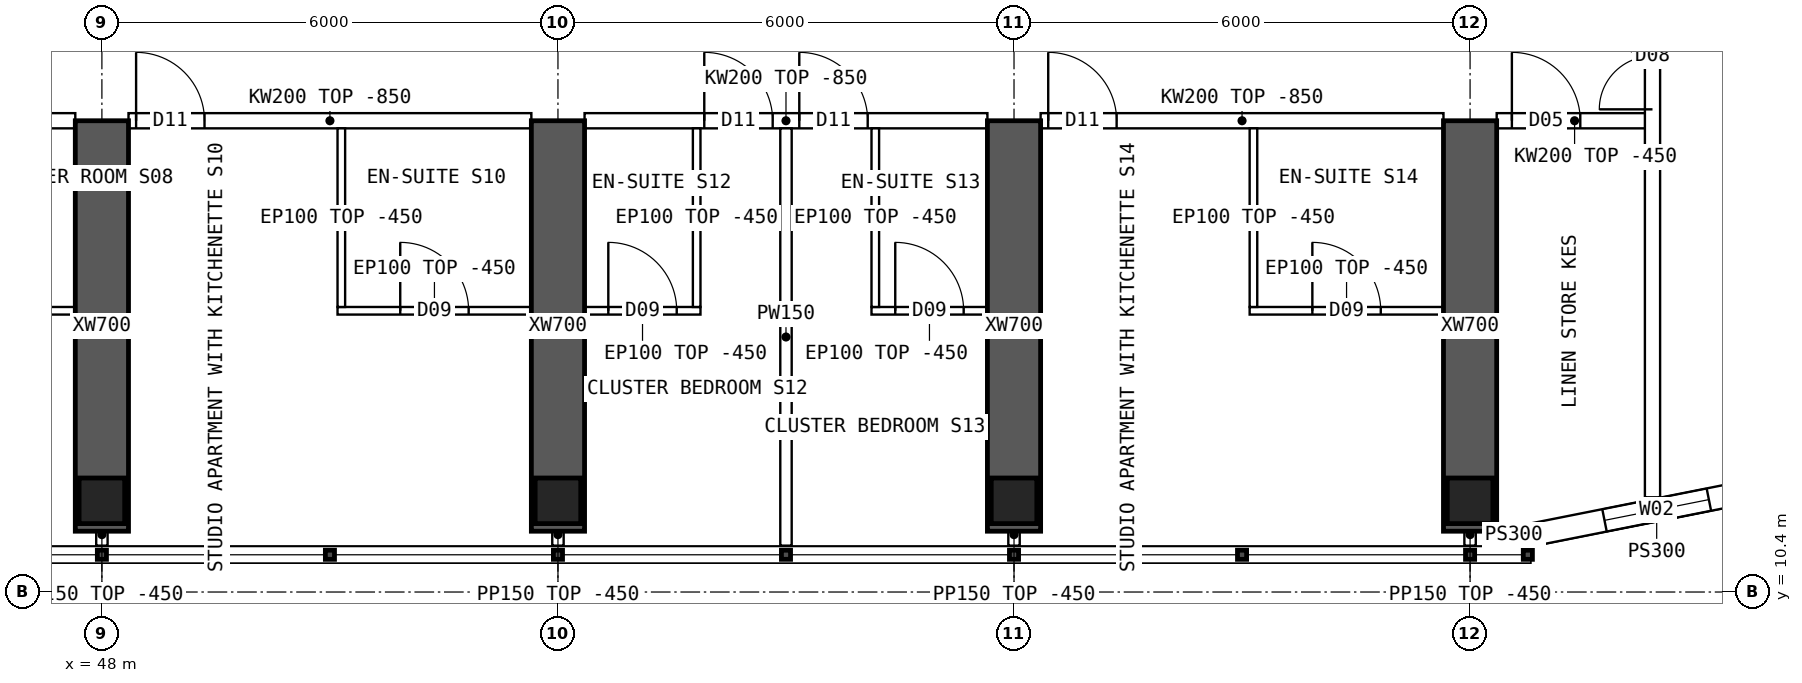
"""IFC4 building model, lengths in metres.
Left out: names, types, materials, properties, quantities, classifications, styles, units other than length and angle.
Written with IfcOpenShell. Run it as: python <this file> out.ifc"""

import sys

from ifc_helpers import new_model, si_unit, direction, frame, frame_2d, origin, origin_2d, place, context, subcontext, project, spatial, polyline, rectangle, hollow_rectangle, outline, extrude, element, fill, save


model = new_model("IFC4")
c1 = context("Model", 3, precision=1e-05, world=origin(), true_north=direction((0.0, 1.0)))
c2 = subcontext(c1, "Body", "Model", "MODEL_VIEW")
j1 = project(units=[si_unit("LENGTHUNIT", "METRE"), si_unit("PLANEANGLEUNIT", "RADIAN")], contexts=[c1])
p1 = place(None, origin())
s1 = spatial("IfcSite", under=j1, at=p1, CompositionType="ELEMENT")
p2 = place(p1, origin())
s2 = spatial("IfcBuilding", under=s1, at=p2, CompositionType="ELEMENT")
p3 = place(p2, frame((0.0, 0.0, 212.8)))
s3 = spatial("IfcBuildingStorey", under=s2, at=p3, CompositionType="ELEMENT", Elevation=212.8)
for number, where, z_axis, x_axis in (
    (1, (48.0, 11.6, 0.0), (0.0, 0.0, 1.0), (1.0, 0.0, 0.0)),
    (2, (54.0, 11.6, 0.0), (0.0, 0.0, 1.0), (1.0, 0.0, 0.0)),
    (3, (60.0, 11.6, 0.0), (0.0, 0.0, 1.0), (1.0, 0.0, 0.0)),
    (4, (66.0, 11.6, 0.0), (0.0, 0.0, 1.0), (1.0, 0.0, 0.0)),
):
    element("IfcColumn", number, at=place(p3, frame(where, z_axis=z_axis, x_axis=x_axis)), inside=s3, PredefinedType="COLUMN", context=c2, shape_type="SweptSolid", body=[
        extrude(hollow_rectangle(XDim=0.6, YDim=0.6, WallThickness=0.06, at=origin_2d()), origin(), (0.0, 0.0, 1.0), 3.75),
    ])
for number, where, z_axis, x_axis in (
    (5, (48.0, 11.2, 0.0), (0.0, 0.0, 1.0), (0.0, 1.0, 0.0)),
    (6, (54.0, 11.2, 0.0), (0.0, 0.0, 1.0), (0.0, 1.0, 0.0)),
    (7, (60.0, 11.2, 0.0), (0.0, 0.0, 1.0), (0.0, 1.0, 0.0)),
    (8, (66.0, 11.2, 0.0), (0.0, 0.0, 1.0), (0.0, 1.0, 0.0)),
):
    element("IfcWall", number, at=place(p3, frame(where, z_axis=z_axis, x_axis=x_axis)), inside=s3, PredefinedType="SHEAR", context=c2, shape_type="SweptSolid", body=[
        extrude(rectangle(XDim=5.4, YDim=0.7, at=frame_2d((2.7, 0.0))), origin(), (0.0, 0.0, 1.0), 3.75),
    ])
p4 = place(p3, frame((66.8, 11.15, 0.0), z_axis=(0.0, 0.0, 1.0), x_axis=(0.98078325777, 0.195100490205, 0.0)))
e9 = element("IfcWall", 9, at=p4, inside=s3, PredefinedType="SOLIDWALL", context=c2, shape_type="SweptSolid", body=[
    extrude(outline(polyline([(-0.03, -0.15), (3.405, -0.15), (3.345, 0.15), (0.03, 0.15), (-0.03, -0.15)])), origin(), (0.0, 0.0, 1.0), 3.3),
])
p5 = place(p4, frame((0.988, 0.0, 0.9)))
e10 = element("IfcOpeningElement", 10, at=p5, cuts=e9, PredefinedType="OPENING", context=c2, shape_type="SweptSolid", body=[
    extrude(rectangle(XDim=1.4, YDim=1.8, at=frame_2d((0.7, 0.9))), frame((0.0, 0.16, 0.0), z_axis=(0.0, -1.0, 0.0), x_axis=(1.0, 0.0, 0.0)), (0.0, 0.0, 1.0), 0.32),
])
p6 = place(p3, frame((66.8, 11.15, 0.0), z_axis=(0.0, 0.0, 1.0), x_axis=(-1.0, 0.0, 0.0)))
e11 = element("IfcWall", 11, at=p6, inside=s3, PredefinedType="SOLIDWALL", context=c2, shape_type="SweptSolid", body=[
    extrude(rectangle(XDim=0.45, YDim=0.3, at=frame_2d((0.225, 0.0))), origin(), (0.0, 0.0, 1.0), 3.3),
])
p7 = place(p3, frame((42.35, 16.6, 0.0), z_axis=(0.0, 0.0, 1.0), x_axis=(1.0, 0.0, 0.0)))
e12 = element("IfcWall", 12, at=p7, inside=s3, PredefinedType="SOLIDWALL", context=c2, shape_type="SweptSolid", body=[
    extrude(outline(polyline([(0.0, 0.0), (5.3, 0.0), (5.3, 2.9), (0.0, 2.9), (0.0, 0.0)])), frame((0.0, 0.1, 0.0), z_axis=(0.0, -1.0, 0.0), x_axis=(1.0, 0.0, 0.0)), (0.0, 0.0, 1.0), 0.2),
])
p8 = place(p7, frame((2.3, 0.0, 0.0)))
e13 = element("IfcOpeningElement", 13, at=p8, cuts=e12, PredefinedType="OPENING", context=c2, shape_type="SweptSolid", body=[
    extrude(rectangle(XDim=0.9, YDim=2.1, at=frame_2d((0.45, 1.05))), frame((0.0, 0.11, 0.0), z_axis=(0.0, -1.0, 0.0), x_axis=(1.0, 0.0, 0.0)), (0.0, 0.0, 1.0), 0.22),
])
p9 = place(p3, frame((48.35, 16.6, 0.0), z_axis=(0.0, 0.0, 1.0), x_axis=(1.0, 0.0, 0.0)))
e14 = element("IfcWall", 14, at=p9, inside=s3, PredefinedType="SOLIDWALL", context=c2, shape_type="SweptSolid", body=[
    extrude(outline(polyline([(0.0, 0.0), (5.3, 0.0), (5.3, 2.9), (0.0, 2.9), (0.0, 0.0)])), frame((0.0, 0.1, 0.0), z_axis=(0.0, -1.0, 0.0), x_axis=(1.0, 0.0, 0.0)), (0.0, 0.0, 1.0), 0.2),
])
p10 = place(p9, frame((0.1, 0.0, 0.0)))
e15 = element("IfcOpeningElement", 15, at=p10, cuts=e14, PredefinedType="OPENING", context=c2, shape_type="SweptSolid", body=[
    extrude(rectangle(XDim=0.9, YDim=2.1, at=frame_2d((0.45, 1.05))), frame((0.0, 0.11, 0.0), z_axis=(0.0, -1.0, 0.0), x_axis=(1.0, 0.0, 0.0)), (0.0, 0.0, 1.0), 0.22),
])
p11 = place(p3, frame((54.35, 16.6, 0.0), z_axis=(0.0, 0.0, 1.0), x_axis=(1.0, 0.0, 0.0)))
e16 = element("IfcWall", 16, at=p11, inside=s3, PredefinedType="SOLIDWALL", context=c2, shape_type="SweptSolid", body=[
    extrude(outline(polyline([(0.0, 0.0), (5.3, 0.0), (5.3, 2.9), (0.0, 2.9), (0.0, 0.0)])), frame((0.0, 0.1, 0.0), z_axis=(0.0, -1.0, 0.0), x_axis=(1.0, 0.0, 0.0)), (0.0, 0.0, 1.0), 0.2),
])
p12 = place(p11, frame((1.575, 0.0, 0.0)))
e17 = element("IfcOpeningElement", 17, at=p12, cuts=e16, PredefinedType="OPENING", context=c2, shape_type="SweptSolid", body=[
    extrude(rectangle(XDim=0.9, YDim=2.1, at=frame_2d((0.45, 1.05))), frame((0.0, 0.11, 0.0), z_axis=(0.0, -1.0, 0.0), x_axis=(1.0, 0.0, 0.0)), (0.0, 0.0, 1.0), 0.22),
])
p13 = place(p11, frame((2.825, 0.0, 0.0)))
e18 = element("IfcOpeningElement", 18, at=p13, cuts=e16, PredefinedType="OPENING", context=c2, shape_type="SweptSolid", body=[
    extrude(rectangle(XDim=0.9, YDim=2.1, at=frame_2d((0.45, 1.05))), frame((0.0, 0.11, 0.0), z_axis=(0.0, -1.0, 0.0), x_axis=(1.0, 0.0, 0.0)), (0.0, 0.0, 1.0), 0.22),
])
p14 = place(p3, frame((60.35, 16.6, 0.0), z_axis=(0.0, 0.0, 1.0), x_axis=(1.0, 0.0, 0.0)))
e19 = element("IfcWall", 19, at=p14, inside=s3, PredefinedType="SOLIDWALL", context=c2, shape_type="SweptSolid", body=[
    extrude(outline(polyline([(0.0, 0.0), (5.3, 0.0), (5.3, 2.9), (0.0, 2.9), (0.0, 0.0)])), frame((0.0, 0.1, 0.0), z_axis=(0.0, -1.0, 0.0), x_axis=(1.0, 0.0, 0.0)), (0.0, 0.0, 1.0), 0.2),
])
p15 = place(p14, frame((0.1, 0.0, 0.0)))
e20 = element("IfcOpeningElement", 20, at=p15, cuts=e19, PredefinedType="OPENING", context=c2, shape_type="SweptSolid", body=[
    extrude(rectangle(XDim=0.9, YDim=2.1, at=frame_2d((0.45, 1.05))), frame((0.0, 0.11, 0.0), z_axis=(0.0, -1.0, 0.0), x_axis=(1.0, 0.0, 0.0)), (0.0, 0.0, 1.0), 0.22),
])
p16 = place(p3, frame((66.35, 16.6, 0.0), z_axis=(0.0, 0.0, 1.0), x_axis=(1.0, 0.0, 0.0)))
e21 = element("IfcWall", 21, at=p16, inside=s3, PredefinedType="SOLIDWALL", context=c2, shape_type="SweptSolid", body=[
    extrude(rectangle(XDim=2.05, YDim=0.2, at=frame_2d((1.025, 0.0))), origin(), (0.0, 0.0, 1.0), 3.3),
])
p17 = place(p16, frame((0.2, 0.0, 0.0)))
e22 = element("IfcOpeningElement", 22, at=p17, cuts=e21, PredefinedType="OPENING", context=c2, shape_type="SweptSolid", body=[
    extrude(rectangle(XDim=0.9, YDim=2.1, at=frame_2d((0.45, 1.05))), frame((0.0, 0.11, 0.0), z_axis=(0.0, -1.0, 0.0), x_axis=(1.0, 0.0, 0.0)), (0.0, 0.0, 1.0), 0.22),
])
p18 = place(p3, frame((47.65, 14.1, 0.0), z_axis=(0.0, 0.0, 1.0), x_axis=(-1.0, 0.0, 0.0)))
e23 = element("IfcWall", 23, at=p18, inside=s3, PredefinedType="PARTITIONING", context=c2, shape_type="SweptSolid", body=[
    extrude(rectangle(XDim=3.15, YDim=0.1, at=frame_2d((1.575, 0.0))), origin(), (0.0, 0.0, 1.0), 3.3),
])
p19 = place(p18, frame((2.1, 0.0, 0.0)))
e24 = element("IfcOpeningElement", 24, at=p19, cuts=e23, PredefinedType="OPENING", context=c2, shape_type="SweptSolid", body=[
    extrude(rectangle(XDim=0.8, YDim=2.1, at=frame_2d((0.4, 1.05))), frame((0.0, 0.06, 0.0), z_axis=(0.0, -1.0, 0.0), x_axis=(1.0, 0.0, 0.0)), (0.0, 0.0, 1.0), 0.12),
])
p20 = place(p3, frame((53.65, 14.1, 0.0), z_axis=(0.0, 0.0, 1.0), x_axis=(-1.0, 0.0, 0.0)))
e25 = element("IfcWall", 25, at=p20, inside=s3, PredefinedType="PARTITIONING", context=c2, shape_type="SweptSolid", body=[
    extrude(rectangle(XDim=2.55, YDim=0.1, at=frame_2d((1.275, 0.0))), origin(), (0.0, 0.0, 1.0), 3.3),
])
p21 = place(p20, frame((0.825, 0.0, 0.0)))
e26 = element("IfcOpeningElement", 26, at=p21, cuts=e25, PredefinedType="OPENING", context=c2, shape_type="SweptSolid", body=[
    extrude(rectangle(XDim=0.9, YDim=2.1, at=frame_2d((0.45, 1.05))), frame((0.0, 0.06, 0.0), z_axis=(0.0, -1.0, 0.0), x_axis=(1.0, 0.0, 0.0)), (0.0, 0.0, 1.0), 0.12),
])
p22 = place(p3, frame((51.15, 14.15, 0.0), z_axis=(0.0, 0.0, 1.0), x_axis=(0.0, 1.0, 0.0)))
e27 = element("IfcWall", 27, at=p22, inside=s3, PredefinedType="PARTITIONING", context=c2, shape_type="SweptSolid", body=[
    extrude(outline(polyline([(0.0, 0.0), (2.35, 0.0), (2.35, 2.9), (2.302, 2.9), (2.3, 3.3), (0.0, 3.3), (0.0, 0.0)])), frame((0.0, 0.05, 0.0), z_axis=(0.0, -1.0, 0.0), x_axis=(1.0, 0.0, 0.0)), (0.0, 0.0, 1.0), 0.1),
])
p23 = place(p3, frame((57.0, 11.01, 0.0), z_axis=(0.0, 0.0, 1.0), x_axis=(0.0, 1.0, 0.0)))
e28 = element("IfcWall", 28, at=p23, inside=s3, PredefinedType="PARTITIONING", context=c2, shape_type="SweptSolid", body=[
    extrude(outline(polyline([(0.0, 0.0), (5.49, 0.0), (5.49, 2.9), (5.442, 2.9), (5.44, 3.3), (0.792, 3.3), (0.79, 2.9), (0.392, 2.9), (0.39, 3.3), (0.0, 3.3), (0.0, 0.0)])), frame((0.0, 0.075, 0.0), z_axis=(0.0, -1.0, 0.0), x_axis=(1.0, 0.0, 0.0)), (0.0, 0.0, 1.0), 0.15),
])
p24 = place(p3, frame((55.875, 14.1, 0.0), z_axis=(0.0, 0.0, 1.0), x_axis=(-1.0, 0.0, 0.0)))
e29 = element("IfcWall", 29, at=p24, inside=s3, PredefinedType="PARTITIONING", context=c2, shape_type="SweptSolid", body=[
    extrude(rectangle(XDim=1.525, YDim=0.1, at=frame_2d((0.762, 0.0))), origin(), (0.0, 0.0, 1.0), 3.3),
])
p25 = place(p24, frame((0.312, 0.0, 0.0)))
e30 = element("IfcOpeningElement", 30, at=p25, cuts=e29, PredefinedType="OPENING", context=c2, shape_type="SweptSolid", body=[
    extrude(rectangle(XDim=0.9, YDim=2.1, at=frame_2d((0.45, 1.05))), frame((0.0, 0.06, 0.0), z_axis=(0.0, -1.0, 0.0), x_axis=(1.0, 0.0, 0.0)), (0.0, 0.0, 1.0), 0.12),
])
p26 = place(p3, frame((55.825, 14.15, 0.0), z_axis=(0.0, 0.0, 1.0), x_axis=(0.0, 1.0, 0.0)))
e31 = element("IfcWall", 31, at=p26, inside=s3, PredefinedType="PARTITIONING", context=c2, shape_type="SweptSolid", body=[
    extrude(outline(polyline([(0.0, 0.0), (2.35, 0.0), (2.35, 2.9), (2.302, 2.9), (2.3, 3.3), (0.0, 3.3), (0.0, 0.0)])), frame((0.0, 0.05, 0.0), z_axis=(0.0, -1.0, 0.0), x_axis=(1.0, 0.0, 0.0)), (0.0, 0.0, 1.0), 0.1),
])
p27 = place(p3, frame((59.65, 14.1, 0.0), z_axis=(0.0, 0.0, 1.0), x_axis=(-1.0, 0.0, 0.0)))
e32 = element("IfcWall", 32, at=p27, inside=s3, PredefinedType="PARTITIONING", context=c2, shape_type="SweptSolid", body=[
    extrude(rectangle(XDim=1.525, YDim=0.1, at=frame_2d((0.762, 0.0))), origin(), (0.0, 0.0, 1.0), 3.3),
])
p28 = place(p27, frame((0.312, 0.0, 0.0)))
e33 = element("IfcOpeningElement", 33, at=p28, cuts=e32, PredefinedType="OPENING", context=c2, shape_type="SweptSolid", body=[
    extrude(rectangle(XDim=0.9, YDim=2.1, at=frame_2d((0.45, 1.05))), frame((0.0, 0.06, 0.0), z_axis=(0.0, -1.0, 0.0), x_axis=(1.0, 0.0, 0.0)), (0.0, 0.0, 1.0), 0.12),
])
p29 = place(p3, frame((58.175, 14.15, 0.0), z_axis=(0.0, 0.0, 1.0), x_axis=(0.0, 1.0, 0.0)))
e34 = element("IfcWall", 34, at=p29, inside=s3, PredefinedType="PARTITIONING", context=c2, shape_type="SweptSolid", body=[
    extrude(outline(polyline([(0.0, 0.0), (2.35, 0.0), (2.35, 2.9), (2.302, 2.9), (2.3, 3.3), (0.0, 3.3), (0.0, 0.0)])), frame((0.0, 0.05, 0.0), z_axis=(0.0, -1.0, 0.0), x_axis=(1.0, 0.0, 0.0)), (0.0, 0.0, 1.0), 0.1),
])
p30 = place(p3, frame((65.65, 14.1, 0.0), z_axis=(0.0, 0.0, 1.0), x_axis=(-1.0, 0.0, 0.0)))
e35 = element("IfcWall", 35, at=p30, inside=s3, PredefinedType="PARTITIONING", context=c2, shape_type="SweptSolid", body=[
    extrude(rectangle(XDim=2.55, YDim=0.1, at=frame_2d((1.275, 0.0))), origin(), (0.0, 0.0, 1.0), 3.3),
])
p31 = place(p30, frame((0.825, 0.0, 0.0)))
e36 = element("IfcOpeningElement", 36, at=p31, cuts=e35, PredefinedType="OPENING", context=c2, shape_type="SweptSolid", body=[
    extrude(rectangle(XDim=0.9, YDim=2.1, at=frame_2d((0.45, 1.05))), frame((0.0, 0.06, 0.0), z_axis=(0.0, -1.0, 0.0), x_axis=(1.0, 0.0, 0.0)), (0.0, 0.0, 1.0), 0.12),
])
p32 = place(p3, frame((63.15, 14.15, 0.0), z_axis=(0.0, 0.0, 1.0), x_axis=(0.0, 1.0, 0.0)))
e37 = element("IfcWall", 37, at=p32, inside=s3, PredefinedType="PARTITIONING", context=c2, shape_type="SweptSolid", body=[
    extrude(outline(polyline([(0.0, 0.0), (2.35, 0.0), (2.35, 2.9), (2.302, 2.9), (2.3, 3.3), (0.0, 3.3), (0.0, 0.0)])), frame((0.0, 0.05, 0.0), z_axis=(0.0, -1.0, 0.0), x_axis=(1.0, 0.0, 0.0)), (0.0, 0.0, 1.0), 0.1),
])
p33 = place(p3, frame((68.4, 11.646, 0.0), z_axis=(0.0, 0.0, 1.0), x_axis=(0.0, 1.0, 0.0)))
e38 = element("IfcWall", 38, at=p33, inside=s3, PredefinedType="SOLIDWALL", context=c2, shape_type="SweptSolid", body=[
    extrude(rectangle(XDim=40.708, YDim=0.2, at=frame_2d((20.354, 0.0))), origin(), (0.0, 0.0, 1.0), 3.3),
])
p34 = place(p33, frame((13.434, 0.0, 0.0)))
e39 = element("IfcOpeningElement", 39, at=p34, cuts=e38, PredefinedType="OPENING", context=c2, shape_type="SweptSolid", body=[
    extrude(rectangle(XDim=1.2, YDim=2.1, at=frame_2d((0.6, 1.05))), frame((0.0, 0.11, 0.0), z_axis=(0.0, -1.0, 0.0), x_axis=(1.0, 0.0, 0.0)), (0.0, 0.0, 1.0), 0.22),
])
p35 = place(p33, frame((26.074, 0.0, 0.0)))
e40 = element("IfcOpeningElement", 40, at=p35, cuts=e38, PredefinedType="OPENING", context=c2, shape_type="SweptSolid", body=[
    extrude(rectangle(XDim=1.2, YDim=2.1, at=frame_2d((0.6, 1.05))), frame((0.0, 0.11, 0.0), z_axis=(0.0, -1.0, 0.0), x_axis=(1.0, 0.0, 0.0)), (0.0, 0.0, 1.0), 0.22),
])
p36 = place(p33, frame((5.104, 0.0, 0.0)))
e41 = element("IfcOpeningElement", 41, at=p36, cuts=e38, PredefinedType="OPENING", context=c2, shape_type="SweptSolid", body=[
    extrude(rectangle(XDim=1.4, YDim=2.1, at=frame_2d((0.7, 1.05))), frame((0.0, 0.11, 0.0), z_axis=(0.0, -1.0, 0.0), x_axis=(1.0, 0.0, 0.0)), (0.0, 0.0, 1.0), 0.22),
])
p37 = place(p33, frame((34.104, 0.0, 0.0)))
e42 = element("IfcOpeningElement", 42, at=p37, cuts=e38, PredefinedType="OPENING", context=c2, shape_type="SweptSolid", body=[
    extrude(rectangle(XDim=1.4, YDim=2.1, at=frame_2d((0.7, 1.05))), frame((0.0, 0.11, 0.0), z_axis=(0.0, -1.0, 0.0), x_axis=(1.0, 0.0, 0.0)), (0.0, 0.0, 1.0), 0.22),
])
for number, where, z_axis, x_axis in (
    (43, (48.0, 11.3, 0.0), (0.0, 0.0, 1.0), (0.0, -1.0, 0.0)),
    (44, (54.0, 11.3, 0.0), (0.0, 0.0, 1.0), (0.0, -1.0, 0.0)),
    (45, (60.0, 11.3, 0.0), (0.0, 0.0, 1.0), (0.0, -1.0, 0.0)),
    (46, (66.0, 11.3, 0.0), (0.0, 0.0, 1.0), (0.0, -1.0, 0.0)),
):
    element("IfcWall", number, at=place(p3, frame(where, z_axis=z_axis, x_axis=x_axis)), inside=s3, PredefinedType="PARTITIONING", context=c2, shape_type="SweptSolid", body=[
        extrude(rectangle(XDim=0.29, YDim=0.15, at=frame_2d((0.145, 0.0))), origin(), (0.0, 0.0, 1.0), 3.3),
    ])
p38 = place(p5, origin())
e47 = element("IfcWindow", 47, at=p38, inside=s3, PartitioningType="SINGLE_PANEL", PredefinedType="WINDOW", context=c2, shape_type="SweptSolid", body=[
    extrude(rectangle(XDim=1.4, YDim=1.8, at=frame_2d((0.7, 0.9))), frame((0.0, 0.03, 0.0), z_axis=(0.0, -1.0, 0.0), x_axis=(1.0, 0.0, 0.0)), (0.0, 0.0, 1.0), 0.06),
])
fill(e10, e47)
p39 = place(p21, origin())
e48 = element("IfcDoor", 48, at=p39, inside=s3, OperationType="SINGLE_SWING_RIGHT", PredefinedType="DOOR", context=c2, shape_type="SweptSolid", body=[
    extrude(rectangle(XDim=0.9, YDim=2.1, at=frame_2d((0.45, 1.05))), frame((0.0, 0.025, 0.0), z_axis=(0.0, -1.0, 0.0), x_axis=(1.0, 0.0, 0.0)), (0.0, 0.0, 1.0), 0.05),
])
fill(e26, e48)
p40 = place(p10, origin())
e49 = element("IfcDoor", 49, at=p40, inside=s3, OperationType="SINGLE_SWING_LEFT", PredefinedType="DOOR", context=c2, shape_type="SweptSolid", body=[
    extrude(rectangle(XDim=0.9, YDim=2.1, at=frame_2d((0.45, 1.05))), frame((0.0, 0.025, 0.0), z_axis=(0.0, -1.0, 0.0), x_axis=(1.0, 0.0, 0.0)), (0.0, 0.0, 1.0), 0.05),
])
fill(e15, e49)
p41 = place(p25, origin())
e50 = element("IfcDoor", 50, at=p41, inside=s3, OperationType="SINGLE_SWING_RIGHT", PredefinedType="DOOR", context=c2, shape_type="SweptSolid", body=[
    extrude(rectangle(XDim=0.9, YDim=2.1, at=frame_2d((0.45, 1.05))), frame((0.0, 0.025, 0.0), z_axis=(0.0, -1.0, 0.0), x_axis=(1.0, 0.0, 0.0)), (0.0, 0.0, 1.0), 0.05),
])
fill(e30, e50)
p42 = place(p12, origin())
e51 = element("IfcDoor", 51, at=p42, inside=s3, OperationType="SINGLE_SWING_LEFT", PredefinedType="DOOR", context=c2, shape_type="SweptSolid", body=[
    extrude(rectangle(XDim=0.9, YDim=2.1, at=frame_2d((0.45, 1.05))), frame((0.0, 0.025, 0.0), z_axis=(0.0, -1.0, 0.0), x_axis=(1.0, 0.0, 0.0)), (0.0, 0.0, 1.0), 0.05),
])
fill(e17, e51)
p43 = place(p28, origin())
e52 = element("IfcDoor", 52, at=p43, inside=s3, OperationType="SINGLE_SWING_RIGHT", PredefinedType="DOOR", context=c2, shape_type="SweptSolid", body=[
    extrude(rectangle(XDim=0.9, YDim=2.1, at=frame_2d((0.45, 1.05))), frame((0.0, 0.025, 0.0), z_axis=(0.0, -1.0, 0.0), x_axis=(1.0, 0.0, 0.0)), (0.0, 0.0, 1.0), 0.05),
])
fill(e33, e52)
p44 = place(p13, origin())
e53 = element("IfcDoor", 53, at=p44, inside=s3, OperationType="SINGLE_SWING_LEFT", PredefinedType="DOOR", context=c2, shape_type="SweptSolid", body=[
    extrude(rectangle(XDim=0.9, YDim=2.1, at=frame_2d((0.45, 1.05))), frame((0.0, 0.025, 0.0), z_axis=(0.0, -1.0, 0.0), x_axis=(1.0, 0.0, 0.0)), (0.0, 0.0, 1.0), 0.05),
])
fill(e18, e53)
p45 = place(p31, origin())
e54 = element("IfcDoor", 54, at=p45, inside=s3, OperationType="SINGLE_SWING_RIGHT", PredefinedType="DOOR", context=c2, shape_type="SweptSolid", body=[
    extrude(rectangle(XDim=0.9, YDim=2.1, at=frame_2d((0.45, 1.05))), frame((0.0, 0.025, 0.0), z_axis=(0.0, -1.0, 0.0), x_axis=(1.0, 0.0, 0.0)), (0.0, 0.0, 1.0), 0.05),
])
fill(e36, e54)
p46 = place(p15, origin())
e55 = element("IfcDoor", 55, at=p46, inside=s3, OperationType="SINGLE_SWING_LEFT", PredefinedType="DOOR", context=c2, shape_type="SweptSolid", body=[
    extrude(rectangle(XDim=0.9, YDim=2.1, at=frame_2d((0.45, 1.05))), frame((0.0, 0.025, 0.0), z_axis=(0.0, -1.0, 0.0), x_axis=(1.0, 0.0, 0.0)), (0.0, 0.0, 1.0), 0.05),
])
fill(e20, e55)
p47 = place(p36, origin())
e56 = element("IfcDoor", 56, at=p47, inside=s3, OperationType="DOUBLE_DOOR_SINGLE_SWING", PredefinedType="DOOR", context=c2, shape_type="SweptSolid", body=[
    extrude(rectangle(XDim=1.4, YDim=2.1, at=frame_2d((0.7, 1.05))), frame((0.0, 0.025, 0.0), z_axis=(0.0, -1.0, 0.0), x_axis=(1.0, 0.0, 0.0)), (0.0, 0.0, 1.0), 0.05),
])
fill(e41, e56)
p48 = place(p17, origin())
e57 = element("IfcDoor", 57, at=p48, inside=s3, OperationType="SINGLE_SWING_LEFT", PredefinedType="DOOR", context=c2, shape_type="SweptSolid", body=[
    extrude(rectangle(XDim=0.9, YDim=2.1, at=frame_2d((0.45, 1.05))), frame((0.0, 0.025, 0.0), z_axis=(0.0, -1.0, 0.0), x_axis=(1.0, 0.0, 0.0)), (0.0, 0.0, 1.0), 0.05),
])
fill(e22, e57)
save(model, sys.argv[1])
